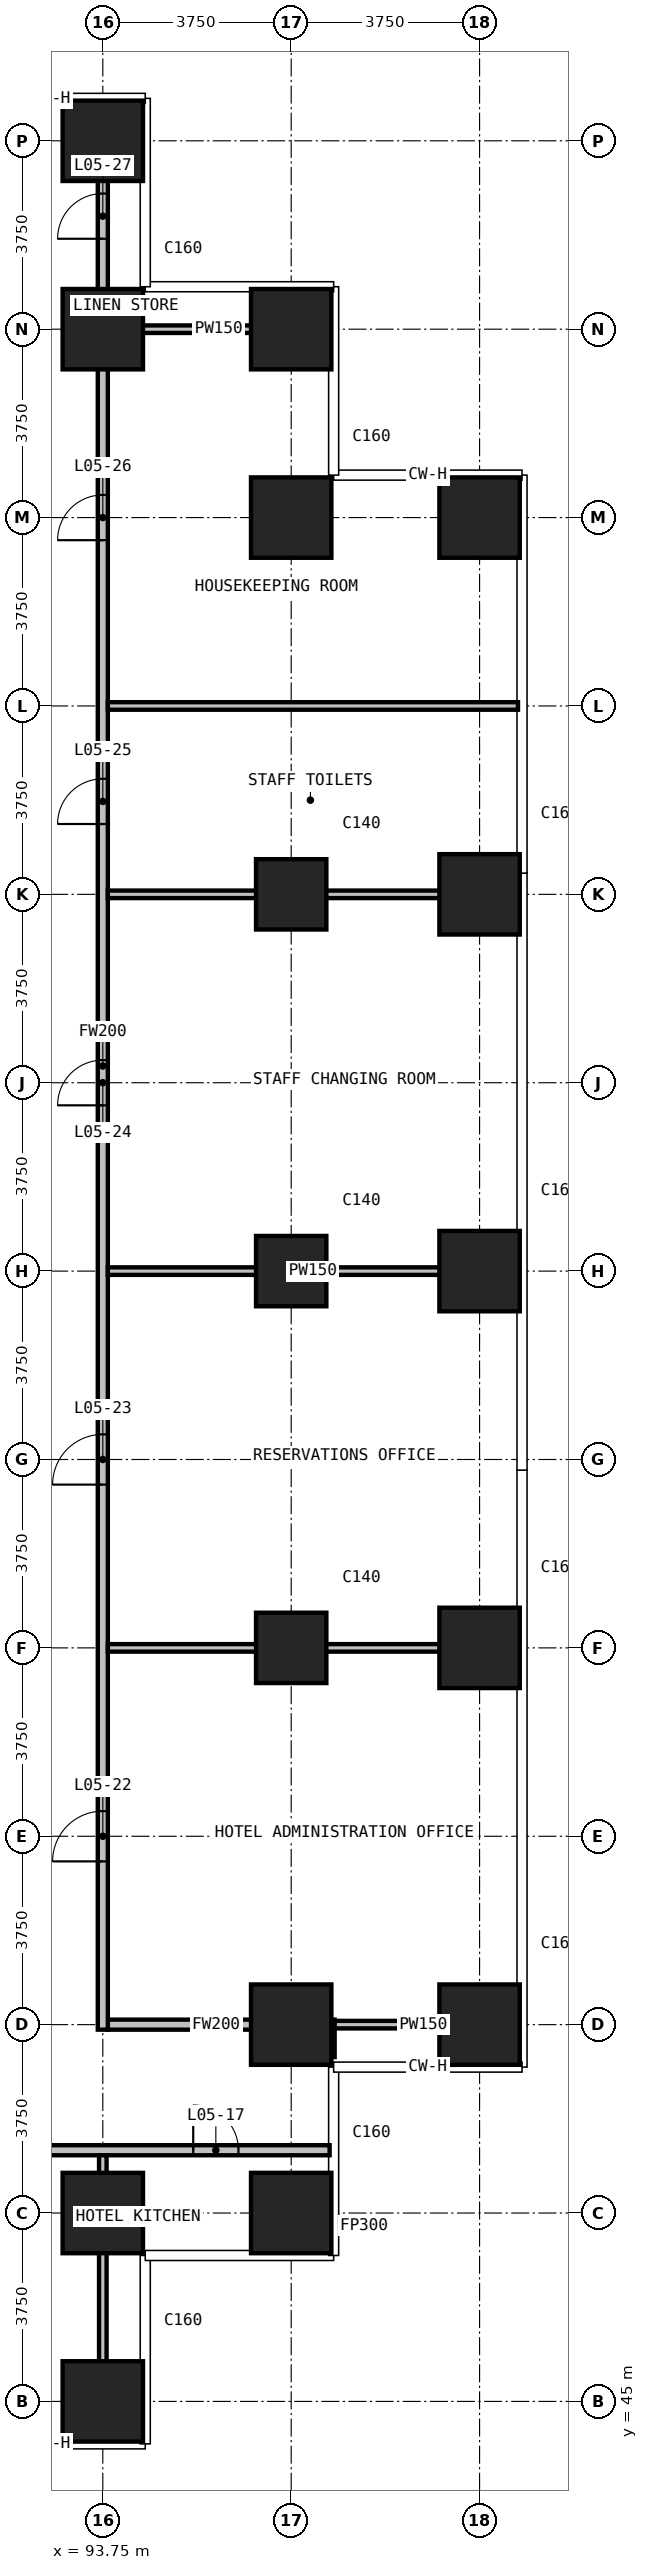
"""IFC4 building model, lengths in metres.
Left out: names, types, materials, properties, quantities, classifications, styles, units other than length and angle.
Written with IfcOpenShell. Run it as: python <this file> out.ifc"""

import sys

from ifc_helpers import new_model, si_unit, direction, frame, frame_2d, origin, origin_2d, place, context, subcontext, project, spatial, rectangle, extrude, element, fill, save


model = new_model("IFC4")
c1 = context("Model", 3, precision=1e-05, world=origin(), true_north=direction((0.0, 1.0)))
c2 = subcontext(c1, "Body", "Model", "MODEL_VIEW")
j1 = project(units=[si_unit("LENGTHUNIT", "METRE"), si_unit("PLANEANGLEUNIT", "RADIAN")], contexts=[c1])
p1 = place(None, origin())
s1 = spatial("IfcSite", under=j1, at=p1, CompositionType="ELEMENT")
p2 = place(p1, origin())
s2 = spatial("IfcBuilding", under=s1, at=p2, CompositionType="ELEMENT")
p3 = place(p2, frame((0.0, 0.0, 35.0)))
s3 = spatial("IfcBuildingStorey", under=s2, at=p3, CompositionType="ELEMENT", Elevation=35.0)
for number, where, z_axis, x_axis in (
    (1, (93.75, 45.0, 0.0), (0.0, 0.0, 1.0), (1.0, 0.0, 0.0)),
    (2, (93.75, 48.75, 0.0), (0.0, 0.0, 1.0), (1.0, 0.0, 0.0)),
    (3, (93.75, 86.25, 0.0), (0.0, 0.0, 1.0), (1.0, 0.0, 0.0)),
    (4, (93.75, 90.0, 0.0), (0.0, 0.0, 1.0), (1.0, 0.0, 0.0)),
    (5, (97.5, 48.75, 0.0), (0.0, 0.0, 1.0), (1.0, 0.0, 0.0)),
    (6, (97.5, 52.5, 0.0), (0.0, 0.0, 1.0), (1.0, 0.0, 0.0)),
):
    element("IfcColumn", number, at=place(p3, frame(where, z_axis=z_axis, x_axis=x_axis)), inside=s3, PredefinedType="COLUMN", context=c2, shape_type="SweptSolid", body=[
        extrude(rectangle(XDim=1.6, YDim=1.6, at=origin_2d()), origin(), (0.0, 0.0, 1.0), 4.5),
    ])
for number, where, z_axis, x_axis in (
    (7, (97.5, 60.0, 0.0), (0.0, 0.0, 1.0), (1.0, 0.0, 0.0)),
    (8, (97.5, 67.5, 0.0), (0.0, 0.0, 1.0), (1.0, 0.0, 0.0)),
    (9, (97.5, 75.0, 0.0), (0.0, 0.0, 1.0), (1.0, 0.0, 0.0)),
):
    element("IfcColumn", number, at=place(p3, frame(where, z_axis=z_axis, x_axis=x_axis)), inside=s3, PredefinedType="COLUMN", context=c2, shape_type="SweptSolid", body=[
        extrude(rectangle(XDim=1.4, YDim=1.4, at=origin_2d()), origin(), (0.0, 0.0, 1.0), 4.5),
    ])
for number, where, z_axis, x_axis in (
    (10, (97.5, 82.5, 0.0), (0.0, 0.0, 1.0), (1.0, 0.0, 0.0)),
    (11, (97.5, 86.25, 0.0), (0.0, 0.0, 1.0), (1.0, 0.0, 0.0)),
    (12, (101.25, 52.5, 0.0), (0.0, 0.0, 1.0), (1.0, 0.0, 0.0)),
    (13, (101.25, 60.0, 0.0), (0.0, 0.0, 1.0), (1.0, 0.0, 0.0)),
    (14, (101.25, 67.5, 0.0), (0.0, 0.0, 1.0), (1.0, 0.0, 0.0)),
    (15, (101.25, 75.0, 0.0), (0.0, 0.0, 1.0), (1.0, 0.0, 0.0)),
    (16, (101.25, 82.5, 0.0), (0.0, 0.0, 1.0), (1.0, 0.0, 0.0)),
):
    element("IfcColumn", number, at=place(p3, frame(where, z_axis=z_axis, x_axis=x_axis)), inside=s3, PredefinedType="COLUMN", context=c2, shape_type="SweptSolid", body=[
        extrude(rectangle(XDim=1.6, YDim=1.6, at=origin_2d()), origin(), (0.0, 0.0, 1.0), 4.5),
    ])
p4 = place(p3, frame((51.735, 50.0, 0.0), z_axis=(0.0, 0.0, 1.0), x_axis=(1.0, 0.0, 0.0)))
e17 = element("IfcWall", 17, at=p4, inside=s3, PredefinedType="PARTITIONING", context=c2, shape_type="SweptSolid", body=[
    extrude(rectangle(XDim=46.53, YDim=0.2, at=frame_2d((23.265, 0.0))), origin(), (0.0, 0.0, 1.0), 4.2),
])
p5 = place(p4, frame((1.9, 0.0, 0.0)))
e18 = element("IfcOpeningElement", 18, at=p5, cuts=e17, PredefinedType="OPENING", context=c2, shape_type="SweptSolid", body=[
    extrude(rectangle(XDim=1.8, YDim=2.2, at=frame_2d((0.9, 1.1))), frame((0.0, 0.11, 0.0), z_axis=(0.0, -1.0, 0.0), x_axis=(1.0, 0.0, 0.0)), (0.0, 0.0, 1.0), 0.22),
])
p6 = place(p4, frame((11.515, 0.0, 0.0)))
e19 = element("IfcOpeningElement", 19, at=p6, cuts=e17, PredefinedType="OPENING", context=c2, shape_type="SweptSolid", body=[
    extrude(rectangle(XDim=1.0, YDim=2.2, at=frame_2d((0.5, 1.1))), frame((0.0, 0.11, 0.0), z_axis=(0.0, -1.0, 0.0), x_axis=(1.0, 0.0, 0.0)), (0.0, 0.0, 1.0), 0.22),
])
p7 = place(p4, frame((19.015, 0.0, 0.0)))
e20 = element("IfcOpeningElement", 20, at=p7, cuts=e17, PredefinedType="OPENING", context=c2, shape_type="SweptSolid", body=[
    extrude(rectangle(XDim=1.0, YDim=2.2, at=frame_2d((0.5, 1.1))), frame((0.0, 0.11, 0.0), z_axis=(0.0, -1.0, 0.0), x_axis=(1.0, 0.0, 0.0)), (0.0, 0.0, 1.0), 0.22),
])
p8 = place(p4, frame((28.365, 0.0, 0.0)))
e21 = element("IfcOpeningElement", 21, at=p8, cuts=e17, PredefinedType="OPENING", context=c2, shape_type="SweptSolid", body=[
    extrude(rectangle(XDim=1.0, YDim=2.2, at=frame_2d((0.5, 1.1))), frame((0.0, 0.11, 0.0), z_axis=(0.0, -1.0, 0.0), x_axis=(1.0, 0.0, 0.0)), (0.0, 0.0, 1.0), 0.22),
])
p9 = place(p4, frame((37.765, 0.0, 0.0)))
e22 = element("IfcOpeningElement", 22, at=p9, cuts=e17, PredefinedType="OPENING", context=c2, shape_type="SweptSolid", body=[
    extrude(rectangle(XDim=1.0, YDim=2.2, at=frame_2d((0.5, 1.1))), frame((0.0, 0.11, 0.0), z_axis=(0.0, -1.0, 0.0), x_axis=(1.0, 0.0, 0.0)), (0.0, 0.0, 1.0), 0.22),
])
p10 = place(p4, frame((43.815, 0.0, 0.0)))
e23 = element("IfcOpeningElement", 23, at=p10, cuts=e17, PredefinedType="OPENING", context=c2, shape_type="SweptSolid", body=[
    extrude(rectangle(XDim=0.9, YDim=2.2, at=frame_2d((0.45, 1.1))), frame((0.0, 0.11, 0.0), z_axis=(0.0, -1.0, 0.0), x_axis=(1.0, 0.0, 0.0)), (0.0, 0.0, 1.0), 0.22),
])
p11 = place(p3, frame((93.85, 52.5, 0.0), z_axis=(0.0, 0.0, 1.0), x_axis=(1.0, 0.0, 0.0)))
e24 = element("IfcWall", 24, at=p11, inside=s3, PredefinedType="PARTITIONING", context=c2, shape_type="SweptSolid", body=[
    extrude(rectangle(XDim=4.315, YDim=0.2, at=frame_2d((2.157, 0.0))), origin(), (0.0, 0.0, 1.0), 4.2),
])
p12 = place(p3, frame((93.75, 52.4, 0.0), z_axis=(0.0, 0.0, 1.0), x_axis=(0.0, 1.0, 0.0)))
e25 = element("IfcWall", 25, at=p12, inside=s3, PredefinedType="PARTITIONING", context=c2, shape_type="SweptSolid", body=[
    extrude(rectangle(XDim=38.365, YDim=0.2, at=frame_2d((19.183, 0.0))), origin(), (0.0, 0.0, 1.0), 4.2),
])
p13 = place(p12, frame((3.35, 0.0, 0.0)))
e26 = element("IfcOpeningElement", 26, at=p13, cuts=e25, PredefinedType="OPENING", context=c2, shape_type="SweptSolid", body=[
    extrude(rectangle(XDim=1.0, YDim=2.2, at=frame_2d((0.5, 1.1))), frame((0.0, 0.11, 0.0), z_axis=(0.0, -1.0, 0.0), x_axis=(1.0, 0.0, 0.0)), (0.0, 0.0, 1.0), 0.22),
])
p14 = place(p12, frame((10.85, 0.0, 0.0)))
e27 = element("IfcOpeningElement", 27, at=p14, cuts=e25, PredefinedType="OPENING", context=c2, shape_type="SweptSolid", body=[
    extrude(rectangle(XDim=1.0, YDim=2.2, at=frame_2d((0.5, 1.1))), frame((0.0, 0.11, 0.0), z_axis=(0.0, -1.0, 0.0), x_axis=(1.0, 0.0, 0.0)), (0.0, 0.0, 1.0), 0.22),
])
p15 = place(p12, frame((18.4, 0.0, 0.0)))
e28 = element("IfcOpeningElement", 28, at=p15, cuts=e25, PredefinedType="OPENING", context=c2, shape_type="SweptSolid", body=[
    extrude(rectangle(XDim=0.9, YDim=2.2, at=frame_2d((0.45, 1.1))), frame((0.0, 0.11, 0.0), z_axis=(0.0, -1.0, 0.0), x_axis=(1.0, 0.0, 0.0)), (0.0, 0.0, 1.0), 0.22),
])
p16 = place(p12, frame((24.0, 0.0, 0.0)))
e29 = element("IfcOpeningElement", 29, at=p16, cuts=e25, PredefinedType="OPENING", context=c2, shape_type="SweptSolid", body=[
    extrude(rectangle(XDim=0.9, YDim=2.2, at=frame_2d((0.45, 1.1))), frame((0.0, 0.11, 0.0), z_axis=(0.0, -1.0, 0.0), x_axis=(1.0, 0.0, 0.0)), (0.0, 0.0, 1.0), 0.22),
])
p17 = place(p12, frame((29.65, 0.0, 0.0)))
e30 = element("IfcOpeningElement", 30, at=p17, cuts=e25, PredefinedType="OPENING", context=c2, shape_type="SweptSolid", body=[
    extrude(rectangle(XDim=0.9, YDim=2.2, at=frame_2d((0.45, 1.1))), frame((0.0, 0.11, 0.0), z_axis=(0.0, -1.0, 0.0), x_axis=(1.0, 0.0, 0.0)), (0.0, 0.0, 1.0), 0.22),
])
p18 = place(p12, frame((35.65, 0.0, 0.0)))
e31 = element("IfcOpeningElement", 31, at=p18, cuts=e25, PredefinedType="OPENING", context=c2, shape_type="SweptSolid", body=[
    extrude(rectangle(XDim=0.9, YDim=2.2, at=frame_2d((0.45, 1.1))), frame((0.0, 0.11, 0.0), z_axis=(0.0, -1.0, 0.0), x_axis=(1.0, 0.0, 0.0)), (0.0, 0.0, 1.0), 0.22),
])
p19 = place(p3, frame((98.265, 51.855, 0.0), z_axis=(0.0, 0.0, 1.0), x_axis=(0.0, 1.0, 0.0)))
e32 = element("IfcWall", 32, at=p19, inside=s3, PredefinedType="PARTITIONING", context=c2, shape_type="SweptSolid", body=[
    extrude(rectangle(XDim=0.745, YDim=0.2, at=frame_2d((0.373, 0.0))), origin(), (0.0, 0.0, 1.0), 4.2),
])
p20 = place(p3, frame((98.365, 52.5, 0.0), z_axis=(0.0, 0.0, 1.0), x_axis=(1.0, 0.0, 0.0)))
e33 = element("IfcWall", 33, at=p20, inside=s3, PredefinedType="PARTITIONING", context=c2, shape_type="SweptSolid", body=[
    extrude(rectangle(XDim=3.53, YDim=0.15, at=frame_2d((1.765, 0.0))), origin(), (0.0, 0.0, 1.0), 4.2),
])
for number, where, z_axis, x_axis in (
    (34, (93.85, 60.0, 0.0), (0.0, 0.0, 1.0), (1.0, 0.0, 0.0)),
    (35, (93.85, 67.5, 0.0), (0.0, 0.0, 1.0), (1.0, 0.0, 0.0)),
    (36, (93.85, 75.0, 0.0), (0.0, 0.0, 1.0), (1.0, 0.0, 0.0)),
    (37, (93.85, 78.75, 0.0), (0.0, 0.0, 1.0), (1.0, 0.0, 0.0)),
):
    element("IfcWall", number, at=place(p3, frame(where, z_axis=z_axis, x_axis=x_axis)), inside=s3, PredefinedType="PARTITIONING", context=c2, shape_type="SweptSolid", body=[
        extrude(rectangle(XDim=8.165, YDim=0.15, at=frame_2d((4.083, 0.0))), origin(), (0.0, 0.0, 1.0), 4.2),
    ])
p21 = place(p3, frame((93.85, 86.25, 0.0), z_axis=(0.0, 0.0, 1.0), x_axis=(1.0, 0.0, 0.0)))
e38 = element("IfcWall", 38, at=p21, inside=s3, PredefinedType="PARTITIONING", context=c2, shape_type="SweptSolid", body=[
    extrude(rectangle(XDim=4.415, YDim=0.15, at=frame_2d((2.208, 0.0))), origin(), (0.0, 0.0, 1.0), 4.2),
])
p22 = place(p3, frame((93.75, 44.235, 0.0), z_axis=(0.0, 0.0, 1.0), x_axis=(0.0, 1.0, 0.0)))
e39 = element("IfcWall", 39, at=p22, inside=s3, PredefinedType="PARTITIONING", context=c2, shape_type="SweptSolid", body=[
    extrude(rectangle(XDim=5.665, YDim=0.15, at=frame_2d((2.833, 0.0))), origin(), (0.0, 0.0, 1.0), 4.2),
])
p23 = place(p10, origin())
e40 = element("IfcDoor", 40, at=p23, inside=s3, OperationType="SINGLE_SWING_RIGHT", PredefinedType="DOOR", context=c2, shape_type="SweptSolid", body=[
    extrude(rectangle(XDim=0.9, YDim=2.2, at=frame_2d((0.45, 1.1))), frame((0.0, 0.025, 0.0), z_axis=(0.0, -1.0, 0.0), x_axis=(1.0, 0.0, 0.0)), (0.0, 0.0, 1.0), 0.05),
])
fill(e23, e40)
p24 = place(p13, origin())
e41 = element("IfcDoor", 41, at=p24, inside=s3, OperationType="SINGLE_SWING_RIGHT", PredefinedType="DOOR", context=c2, shape_type="SweptSolid", body=[
    extrude(rectangle(XDim=1.0, YDim=2.2, at=frame_2d((0.5, 1.1))), frame((0.0, 0.025, 0.0), z_axis=(0.0, -1.0, 0.0), x_axis=(1.0, 0.0, 0.0)), (0.0, 0.0, 1.0), 0.05),
])
fill(e26, e41)
p25 = place(p14, origin())
e42 = element("IfcDoor", 42, at=p25, inside=s3, OperationType="SINGLE_SWING_RIGHT", PredefinedType="DOOR", context=c2, shape_type="SweptSolid", body=[
    extrude(rectangle(XDim=1.0, YDim=2.2, at=frame_2d((0.5, 1.1))), frame((0.0, 0.025, 0.0), z_axis=(0.0, -1.0, 0.0), x_axis=(1.0, 0.0, 0.0)), (0.0, 0.0, 1.0), 0.05),
])
fill(e27, e42)
p26 = place(p15, origin())
e43 = element("IfcDoor", 43, at=p26, inside=s3, OperationType="SINGLE_SWING_LEFT", PredefinedType="DOOR", context=c2, shape_type="SweptSolid", body=[
    extrude(rectangle(XDim=0.9, YDim=2.2, at=frame_2d((0.45, 1.1))), frame((0.0, 0.025, 0.0), z_axis=(0.0, -1.0, 0.0), x_axis=(1.0, 0.0, 0.0)), (0.0, 0.0, 1.0), 0.05),
])
fill(e28, e43)
p27 = place(p16, origin())
e44 = element("IfcDoor", 44, at=p27, inside=s3, OperationType="SINGLE_SWING_LEFT", PredefinedType="DOOR", context=c2, shape_type="SweptSolid", body=[
    extrude(rectangle(XDim=0.9, YDim=2.2, at=frame_2d((0.45, 1.1))), frame((0.0, 0.025, 0.0), z_axis=(0.0, -1.0, 0.0), x_axis=(1.0, 0.0, 0.0)), (0.0, 0.0, 1.0), 0.05),
])
fill(e29, e44)
p28 = place(p17, origin())
e45 = element("IfcDoor", 45, at=p28, inside=s3, OperationType="SINGLE_SWING_LEFT", PredefinedType="DOOR", context=c2, shape_type="SweptSolid", body=[
    extrude(rectangle(XDim=0.9, YDim=2.2, at=frame_2d((0.45, 1.1))), frame((0.0, 0.025, 0.0), z_axis=(0.0, -1.0, 0.0), x_axis=(1.0, 0.0, 0.0)), (0.0, 0.0, 1.0), 0.05),
])
fill(e30, e45)
p29 = place(p18, origin())
e46 = element("IfcDoor", 46, at=p29, inside=s3, OperationType="SINGLE_SWING_RIGHT", PredefinedType="DOOR", context=c2, shape_type="SweptSolid", body=[
    extrude(rectangle(XDim=0.9, YDim=2.2, at=frame_2d((0.45, 1.1))), frame((0.0, 0.025, 0.0), z_axis=(0.0, -1.0, 0.0), x_axis=(1.0, 0.0, 0.0)), (0.0, 0.0, 1.0), 0.05),
])
fill(e31, e46)
save(model, sys.argv[1])
